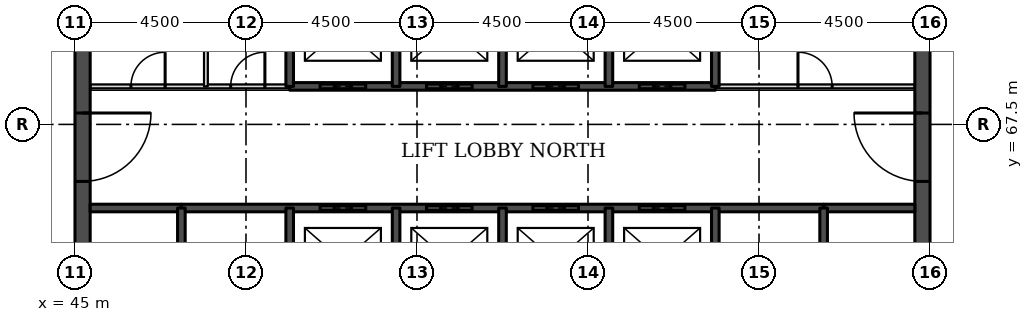
"""IFC4 building model, lengths in metres.
Left out: names, types, materials, properties, quantities, classifications, styles, units other than length and angle.
Written with IfcOpenShell. Run it as: python <this file> out.ifc"""

import sys

from ifc_helpers import new_model, si_unit, direction, frame, frame_2d, origin, place, context, subcontext, project, spatial, rectangle, extrude, element, fill, save


model = new_model("IFC4")
c1 = context("Model", 3, precision=1e-05, world=origin(), true_north=direction((0.0, 1.0)))
c2 = subcontext(c1, "Body", "Model", "MODEL_VIEW")
j1 = project(units=[si_unit("LENGTHUNIT", "METRE"), si_unit("PLANEANGLEUNIT", "RADIAN")], contexts=[c1])
p1 = place(None, origin())
s1 = spatial("IfcSite", under=j1, at=p1, CompositionType="ELEMENT")
p2 = place(p1, origin())
s2 = spatial("IfcBuilding", under=s1, at=p2, CompositionType="ELEMENT")
p3 = place(p2, frame((0.0, 0.0, 143.1)))
s3 = spatial("IfcBuildingStorey", under=s2, at=p3, CompositionType="ELEMENT", Elevation=143.1)
p4 = place(p3, frame((45.2, 49.5, 0.0), z_axis=(0.0, 0.0, 1.0), x_axis=(0.0, 1.0, 0.0)))
e1 = element("IfcWall", 1, at=p4, inside=s3, PredefinedType="SHEAR", context=c2, shape_type="SweptSolid", body=[
    extrude(rectangle(XDim=22.5, YDim=0.4, at=frame_2d((11.25, 0.0))), origin(), (0.0, 0.0, 1.0), 4.6),
])
p5 = place(p4, frame((4.2, 0.0, 0.0)))
e2 = element("IfcOpeningElement", 2, at=p5, cuts=e1, PredefinedType="OPENING", context=c2, shape_type="SweptSolid", body=[
    extrude(rectangle(XDim=1.8, YDim=2.1, at=frame_2d((0.9, 1.05))), frame((0.0, 0.21, 0.0), z_axis=(0.0, -1.0, 0.0), x_axis=(1.0, 0.0, 0.0)), (0.0, 0.0, 1.0), 0.42),
])
p6 = place(p4, frame((6.9, 0.0, 0.0)))
e3 = element("IfcOpeningElement", 3, at=p6, cuts=e1, PredefinedType="OPENING", context=c2, shape_type="SweptSolid", body=[
    extrude(rectangle(XDim=1.1, YDim=2.1, at=frame_2d((0.55, 1.05))), frame((0.0, 0.21, 0.0), z_axis=(0.0, -1.0, 0.0), x_axis=(1.0, 0.0, 0.0)), (0.0, 0.0, 1.0), 0.42),
])
p7 = place(p4, frame((13.6, 0.0, 0.0)))
e4 = element("IfcOpeningElement", 4, at=p7, cuts=e1, PredefinedType="OPENING", context=c2, shape_type="SweptSolid", body=[
    extrude(rectangle(XDim=1.1, YDim=2.1, at=frame_2d((0.55, 1.05))), frame((0.0, 0.21, 0.0), z_axis=(0.0, -1.0, 0.0), x_axis=(1.0, 0.0, 0.0)), (0.0, 0.0, 1.0), 0.42),
])
p8 = place(p4, frame((16.5, 0.0, 0.0)))
e5 = element("IfcOpeningElement", 5, at=p8, cuts=e1, PredefinedType="OPENING", context=c2, shape_type="SweptSolid", body=[
    extrude(rectangle(XDim=1.8, YDim=2.1, at=frame_2d((0.9, 1.05))), frame((0.0, 0.21, 0.0), z_axis=(0.0, -1.0, 0.0), x_axis=(1.0, 0.0, 0.0)), (0.0, 0.0, 1.0), 0.42),
])
p9 = place(p3, frame((67.3, 49.5, 0.0), z_axis=(0.0, 0.0, 1.0), x_axis=(0.0, 1.0, 0.0)))
e6 = element("IfcWall", 6, at=p9, inside=s3, PredefinedType="SHEAR", context=c2, shape_type="SweptSolid", body=[
    extrude(rectangle(XDim=22.5, YDim=0.4, at=frame_2d((11.25, 0.0))), origin(), (0.0, 0.0, 1.0), 4.6),
])
p10 = place(p9, frame((4.2, 0.0, 0.0)))
e7 = element("IfcOpeningElement", 7, at=p10, cuts=e6, PredefinedType="OPENING", context=c2, shape_type="SweptSolid", body=[
    extrude(rectangle(XDim=1.8, YDim=2.1, at=frame_2d((0.9, 1.05))), frame((0.0, 0.21, 0.0), z_axis=(0.0, -1.0, 0.0), x_axis=(1.0, 0.0, 0.0)), (0.0, 0.0, 1.0), 0.42),
])
p11 = place(p9, frame((6.9, 0.0, 0.0)))
e8 = element("IfcOpeningElement", 8, at=p11, cuts=e6, PredefinedType="OPENING", context=c2, shape_type="SweptSolid", body=[
    extrude(rectangle(XDim=1.1, YDim=2.1, at=frame_2d((0.55, 1.05))), frame((0.0, 0.21, 0.0), z_axis=(0.0, -1.0, 0.0), x_axis=(1.0, 0.0, 0.0)), (0.0, 0.0, 1.0), 0.42),
])
p12 = place(p9, frame((13.6, 0.0, 0.0)))
e9 = element("IfcOpeningElement", 9, at=p12, cuts=e6, PredefinedType="OPENING", context=c2, shape_type="SweptSolid", body=[
    extrude(rectangle(XDim=1.1, YDim=2.1, at=frame_2d((0.55, 1.05))), frame((0.0, 0.21, 0.0), z_axis=(0.0, -1.0, 0.0), x_axis=(1.0, 0.0, 0.0)), (0.0, 0.0, 1.0), 0.42),
])
p13 = place(p9, frame((16.5, 0.0, 0.0)))
e10 = element("IfcOpeningElement", 10, at=p13, cuts=e6, PredefinedType="OPENING", context=c2, shape_type="SweptSolid", body=[
    extrude(rectangle(XDim=1.8, YDim=2.1, at=frame_2d((0.9, 1.05))), frame((0.0, 0.21, 0.0), z_axis=(0.0, -1.0, 0.0), x_axis=(1.0, 0.0, 0.0)), (0.0, 0.0, 1.0), 0.42),
])
for number, where, z_axis, x_axis in (
    (11, (45.4, 65.3, 0.0), (0.0, 0.0, 1.0), (1.0, 0.0, 0.0)),
    (12, (64.7, 65.3, 0.0), (0.0, 0.0, 1.0), (1.0, 0.0, 0.0)),
):
    element("IfcWall", number, at=place(p3, frame(where, z_axis=z_axis, x_axis=x_axis)), inside=s3, PredefinedType="SOLIDWALL", context=c2, shape_type="SweptSolid", body=[
        extrude(rectangle(XDim=2.4, YDim=0.2, at=frame_2d((1.2, 0.0))), origin(), (0.0, 0.0, 1.0), 4.45),
    ])
p14 = place(p3, frame((47.8, 65.3, 0.0), z_axis=(0.0, 0.0, 1.0), x_axis=(1.0, 0.0, 0.0)))
e13 = element("IfcWall", 13, at=p14, inside=s3, PredefinedType="SOLIDWALL", context=c2, shape_type="SweptSolid", body=[
    extrude(rectangle(XDim=16.9, YDim=0.2, at=frame_2d((8.45, 0.0))), origin(), (0.0, 0.0, 1.0), 4.45),
])
p15 = place(p14, frame((3.65, 0.0, 0.0)))
e14 = element("IfcOpeningElement", 14, at=p15, cuts=e13, PredefinedType="OPENING", context=c2, shape_type="SweptSolid", body=[
    extrude(rectangle(XDim=1.2, YDim=2.1, at=frame_2d((0.6, 1.05))), frame((0.0, 0.11, 0.0), z_axis=(0.0, -1.0, 0.0), x_axis=(1.0, 0.0, 0.0)), (0.0, 0.0, 1.0), 0.22),
])
p16 = place(p14, frame((6.45, 0.0, 0.0)))
e15 = element("IfcOpeningElement", 15, at=p16, cuts=e13, PredefinedType="OPENING", context=c2, shape_type="SweptSolid", body=[
    extrude(rectangle(XDim=1.2, YDim=2.1, at=frame_2d((0.6, 1.05))), frame((0.0, 0.11, 0.0), z_axis=(0.0, -1.0, 0.0), x_axis=(1.0, 0.0, 0.0)), (0.0, 0.0, 1.0), 0.22),
])
p17 = place(p14, frame((9.25, 0.0, 0.0)))
e16 = element("IfcOpeningElement", 16, at=p17, cuts=e13, PredefinedType="OPENING", context=c2, shape_type="SweptSolid", body=[
    extrude(rectangle(XDim=1.2, YDim=2.1, at=frame_2d((0.6, 1.05))), frame((0.0, 0.11, 0.0), z_axis=(0.0, -1.0, 0.0), x_axis=(1.0, 0.0, 0.0)), (0.0, 0.0, 1.0), 0.22),
])
p18 = place(p14, frame((12.05, 0.0, 0.0)))
e17 = element("IfcOpeningElement", 17, at=p18, cuts=e13, PredefinedType="OPENING", context=c2, shape_type="SweptSolid", body=[
    extrude(rectangle(XDim=1.2, YDim=2.1, at=frame_2d((0.6, 1.05))), frame((0.0, 0.11, 0.0), z_axis=(0.0, -1.0, 0.0), x_axis=(1.0, 0.0, 0.0)), (0.0, 0.0, 1.0), 0.22),
])
p19 = place(p3, frame((45.4, 68.5, 0.0), z_axis=(0.0, 0.0, 1.0), x_axis=(1.0, 0.0, 0.0)))
e18 = element("IfcWall", 18, at=p19, inside=s3, PredefinedType="PARTITIONING", context=c2, shape_type="SweptSolid", body=[
    extrude(rectangle(XDim=5.25, YDim=0.1, at=frame_2d((2.625, 0.0))), origin(), (0.0, 0.0, 1.0), 4.45),
])
p20 = place(p19, frame((1.073, 0.0, 0.0)))
e19 = element("IfcOpeningElement", 19, at=p20, cuts=e18, PredefinedType="OPENING", context=c2, shape_type="SweptSolid", body=[
    extrude(rectangle(XDim=0.9, YDim=2.1, at=frame_2d((0.45, 1.05))), frame((0.0, 0.06, 0.0), z_axis=(0.0, -1.0, 0.0), x_axis=(1.0, 0.0, 0.0)), (0.0, 0.0, 1.0), 0.12),
])
p21 = place(p19, frame((3.698, 0.0, 0.0)))
e20 = element("IfcOpeningElement", 20, at=p21, cuts=e18, PredefinedType="OPENING", context=c2, shape_type="SweptSolid", body=[
    extrude(rectangle(XDim=0.9, YDim=2.1, at=frame_2d((0.45, 1.05))), frame((0.0, 0.06, 0.0), z_axis=(0.0, -1.0, 0.0), x_axis=(1.0, 0.0, 0.0)), (0.0, 0.0, 1.0), 0.12),
])
p22 = place(p3, frame((61.85, 68.5, 0.0), z_axis=(0.0, 0.0, 1.0), x_axis=(1.0, 0.0, 0.0)))
e21 = element("IfcWall", 21, at=p22, inside=s3, PredefinedType="PARTITIONING", context=c2, shape_type="SweptSolid", body=[
    extrude(rectangle(XDim=5.25, YDim=0.1, at=frame_2d((2.625, 0.0))), origin(), (0.0, 0.0, 1.0), 4.45),
])
p23 = place(p22, frame((2.175, 0.0, 0.0)))
e22 = element("IfcOpeningElement", 22, at=p23, cuts=e21, PredefinedType="OPENING", context=c2, shape_type="SweptSolid", body=[
    extrude(rectangle(XDim=0.9, YDim=2.1, at=frame_2d((0.45, 1.05))), frame((0.0, 0.06, 0.0), z_axis=(0.0, -1.0, 0.0), x_axis=(1.0, 0.0, 0.0)), (0.0, 0.0, 1.0), 0.12),
])
p24 = place(p3, frame((50.65, 68.5, 0.0), z_axis=(0.0, 0.0, 1.0), x_axis=(1.0, 0.0, 0.0)))
e23 = element("IfcWall", 23, at=p24, inside=s3, PredefinedType="SOLIDWALL", context=c2, shape_type="SweptSolid", body=[
    extrude(rectangle(XDim=11.2, YDim=0.2, at=frame_2d((5.6, 0.0))), origin(), (0.0, 0.0, 1.0), 4.45),
])
p25 = place(p24, frame((0.8, 0.0, 0.0)))
e24 = element("IfcOpeningElement", 24, at=p25, cuts=e23, PredefinedType="OPENING", context=c2, shape_type="SweptSolid", body=[
    extrude(rectangle(XDim=1.2, YDim=2.1, at=frame_2d((0.6, 1.05))), frame((0.0, 0.11, 0.0), z_axis=(0.0, -1.0, 0.0), x_axis=(1.0, 0.0, 0.0)), (0.0, 0.0, 1.0), 0.22),
])
p26 = place(p24, frame((3.6, 0.0, 0.0)))
e25 = element("IfcOpeningElement", 25, at=p26, cuts=e23, PredefinedType="OPENING", context=c2, shape_type="SweptSolid", body=[
    extrude(rectangle(XDim=1.2, YDim=2.1, at=frame_2d((0.6, 1.05))), frame((0.0, 0.11, 0.0), z_axis=(0.0, -1.0, 0.0), x_axis=(1.0, 0.0, 0.0)), (0.0, 0.0, 1.0), 0.22),
])
p27 = place(p24, frame((6.4, 0.0, 0.0)))
e26 = element("IfcOpeningElement", 26, at=p27, cuts=e23, PredefinedType="OPENING", context=c2, shape_type="SweptSolid", body=[
    extrude(rectangle(XDim=1.2, YDim=2.1, at=frame_2d((0.6, 1.05))), frame((0.0, 0.11, 0.0), z_axis=(0.0, -1.0, 0.0), x_axis=(1.0, 0.0, 0.0)), (0.0, 0.0, 1.0), 0.22),
])
p28 = place(p24, frame((9.2, 0.0, 0.0)))
e27 = element("IfcOpeningElement", 27, at=p28, cuts=e23, PredefinedType="OPENING", context=c2, shape_type="SweptSolid", body=[
    extrude(rectangle(XDim=1.2, YDim=2.1, at=frame_2d((0.6, 1.05))), frame((0.0, 0.11, 0.0), z_axis=(0.0, -1.0, 0.0), x_axis=(1.0, 0.0, 0.0)), (0.0, 0.0, 1.0), 0.22),
])
p29 = place(p3, frame((47.8, 62.0, 0.0), z_axis=(0.0, 0.0, 1.0), x_axis=(0.0, 1.0, 0.0)))
e28 = element("IfcWall", 28, at=p29, inside=s3, PredefinedType="SOLIDWALL", context=c2, shape_type="SweptSolid", body=[
    extrude(rectangle(XDim=3.3, YDim=0.2, at=frame_2d((1.65, 0.0))), origin(), (0.0, 0.0, 1.0), 4.45),
])
p30 = place(p29, frame((1.1, 0.0, 0.0)))
e29 = element("IfcOpeningElement", 29, at=p30, cuts=e28, PredefinedType="OPENING", context=c2, shape_type="SweptSolid", body=[
    extrude(rectangle(XDim=1.1, YDim=2.1, at=frame_2d((0.55, 1.05))), frame((0.0, 0.11, 0.0), z_axis=(0.0, -1.0, 0.0), x_axis=(1.0, 0.0, 0.0)), (0.0, 0.0, 1.0), 0.22),
])
p31 = place(p3, frame((48.445, 68.5, 0.0), z_axis=(0.0, 0.0, 1.0), x_axis=(0.0, 1.0, 0.0)))
e30 = element("IfcWall", 30, at=p31, inside=s3, PredefinedType="PARTITIONING", context=c2, shape_type="SweptSolid", body=[
    extrude(rectangle(XDim=3.1, YDim=0.1, at=frame_2d((1.55, 0.0))), origin(), (0.0, 0.0, 1.0), 4.45),
])
p32 = place(p3, frame((50.65, 62.0, 0.0), z_axis=(0.0, 0.0, 1.0), x_axis=(0.0, 1.0, 0.0)))
e31 = element("IfcWall", 31, at=p32, inside=s3, PredefinedType="SOLIDWALL", context=c2, shape_type="SweptSolid", body=[
    extrude(rectangle(XDim=3.3, YDim=0.2, at=frame_2d((1.65, 0.0))), origin(), (0.0, 0.0, 1.0), 4.45),
])
p33 = place(p3, frame((50.65, 68.5, 0.0), z_axis=(0.0, 0.0, 1.0), x_axis=(0.0, 1.0, 0.0)))
e32 = element("IfcWall", 32, at=p33, inside=s3, PredefinedType="SOLIDWALL", context=c2, shape_type="SweptSolid", body=[
    extrude(rectangle(XDim=3.1, YDim=0.2, at=frame_2d((1.55, 0.0))), origin(), (0.0, 0.0, 1.0), 4.45),
])
p34 = place(p3, frame((53.45, 62.5, 0.0), z_axis=(0.0, 0.0, 1.0), x_axis=(0.0, 1.0, 0.0)))
e33 = element("IfcWall", 33, at=p34, inside=s3, PredefinedType="SOLIDWALL", context=c2, shape_type="SweptSolid", body=[
    extrude(rectangle(XDim=2.8, YDim=0.2, at=frame_2d((1.4, 0.0))), origin(), (0.0, 0.0, 1.0), 4.45),
])
p35 = place(p3, frame((53.45, 68.5, 0.0), z_axis=(0.0, 0.0, 1.0), x_axis=(0.0, 1.0, 0.0)))
e34 = element("IfcWall", 34, at=p35, inside=s3, PredefinedType="SOLIDWALL", context=c2, shape_type="SweptSolid", body=[
    extrude(rectangle(XDim=3.1, YDim=0.2, at=frame_2d((1.55, 0.0))), origin(), (0.0, 0.0, 1.0), 4.45),
])
p36 = place(p3, frame((56.25, 62.5, 0.0), z_axis=(0.0, 0.0, 1.0), x_axis=(0.0, 1.0, 0.0)))
e35 = element("IfcWall", 35, at=p36, inside=s3, PredefinedType="SOLIDWALL", context=c2, shape_type="SweptSolid", body=[
    extrude(rectangle(XDim=2.8, YDim=0.2, at=frame_2d((1.4, 0.0))), origin(), (0.0, 0.0, 1.0), 4.45),
])
p37 = place(p3, frame((56.25, 68.5, 0.0), z_axis=(0.0, 0.0, 1.0), x_axis=(0.0, 1.0, 0.0)))
e36 = element("IfcWall", 36, at=p37, inside=s3, PredefinedType="SOLIDWALL", context=c2, shape_type="SweptSolid", body=[
    extrude(rectangle(XDim=3.1, YDim=0.2, at=frame_2d((1.55, 0.0))), origin(), (0.0, 0.0, 1.0), 4.45),
])
p38 = place(p3, frame((59.05, 62.5, 0.0), z_axis=(0.0, 0.0, 1.0), x_axis=(0.0, 1.0, 0.0)))
e37 = element("IfcWall", 37, at=p38, inside=s3, PredefinedType="SOLIDWALL", context=c2, shape_type="SweptSolid", body=[
    extrude(rectangle(XDim=2.8, YDim=0.2, at=frame_2d((1.4, 0.0))), origin(), (0.0, 0.0, 1.0), 4.45),
])
p39 = place(p3, frame((59.05, 68.5, 0.0), z_axis=(0.0, 0.0, 1.0), x_axis=(0.0, 1.0, 0.0)))
e38 = element("IfcWall", 38, at=p39, inside=s3, PredefinedType="SOLIDWALL", context=c2, shape_type="SweptSolid", body=[
    extrude(rectangle(XDim=3.1, YDim=0.2, at=frame_2d((1.55, 0.0))), origin(), (0.0, 0.0, 1.0), 4.45),
])
p40 = place(p3, frame((61.85, 62.0, 0.0), z_axis=(0.0, 0.0, 1.0), x_axis=(0.0, 1.0, 0.0)))
e39 = element("IfcWall", 39, at=p40, inside=s3, PredefinedType="SOLIDWALL", context=c2, shape_type="SweptSolid", body=[
    extrude(rectangle(XDim=3.3, YDim=0.2, at=frame_2d((1.65, 0.0))), origin(), (0.0, 0.0, 1.0), 4.45),
])
p41 = place(p3, frame((61.85, 68.5, 0.0), z_axis=(0.0, 0.0, 1.0), x_axis=(0.0, 1.0, 0.0)))
e40 = element("IfcWall", 40, at=p41, inside=s3, PredefinedType="SOLIDWALL", context=c2, shape_type="SweptSolid", body=[
    extrude(rectangle(XDim=3.1, YDim=0.2, at=frame_2d((1.55, 0.0))), origin(), (0.0, 0.0, 1.0), 4.45),
])
p42 = place(p3, frame((64.7, 62.0, 0.0), z_axis=(0.0, 0.0, 1.0), x_axis=(0.0, 1.0, 0.0)))
e41 = element("IfcWall", 41, at=p42, inside=s3, PredefinedType="SOLIDWALL", context=c2, shape_type="SweptSolid", body=[
    extrude(rectangle(XDim=3.3, YDim=0.2, at=frame_2d((1.65, 0.0))), origin(), (0.0, 0.0, 1.0), 4.45),
])
p43 = place(p42, frame((1.1, 0.0, 0.0)))
e42 = element("IfcOpeningElement", 42, at=p43, cuts=e41, PredefinedType="OPENING", context=c2, shape_type="SweptSolid", body=[
    extrude(rectangle(XDim=1.1, YDim=2.1, at=frame_2d((0.55, 1.05))), frame((0.0, 0.11, 0.0), z_axis=(0.0, -1.0, 0.0), x_axis=(1.0, 0.0, 0.0)), (0.0, 0.0, 1.0), 0.22),
])
p44 = place(p15, origin())
e43 = element("IfcDoor", 43, at=p44, inside=s3, OperationType="DOUBLE_DOOR_SLIDING", PredefinedType="DOOR", context=c2, shape_type="SweptSolid", body=[
    extrude(rectangle(XDim=1.2, YDim=2.1, at=frame_2d((0.6, 1.05))), frame((0.0, 0.025, 0.0), z_axis=(0.0, -1.0, 0.0), x_axis=(1.0, 0.0, 0.0)), (0.0, 0.0, 1.0), 0.05),
])
fill(e14, e43)
p45 = place(p16, origin())
e44 = element("IfcDoor", 44, at=p45, inside=s3, OperationType="DOUBLE_DOOR_SLIDING", PredefinedType="DOOR", context=c2, shape_type="SweptSolid", body=[
    extrude(rectangle(XDim=1.2, YDim=2.1, at=frame_2d((0.6, 1.05))), frame((0.0, 0.025, 0.0), z_axis=(0.0, -1.0, 0.0), x_axis=(1.0, 0.0, 0.0)), (0.0, 0.0, 1.0), 0.05),
])
fill(e15, e44)
p46 = place(p17, origin())
e45 = element("IfcDoor", 45, at=p46, inside=s3, OperationType="DOUBLE_DOOR_SLIDING", PredefinedType="DOOR", context=c2, shape_type="SweptSolid", body=[
    extrude(rectangle(XDim=1.2, YDim=2.1, at=frame_2d((0.6, 1.05))), frame((0.0, 0.025, 0.0), z_axis=(0.0, -1.0, 0.0), x_axis=(1.0, 0.0, 0.0)), (0.0, 0.0, 1.0), 0.05),
])
fill(e16, e45)
p47 = place(p18, origin())
e46 = element("IfcDoor", 46, at=p47, inside=s3, OperationType="DOUBLE_DOOR_SLIDING", PredefinedType="DOOR", context=c2, shape_type="SweptSolid", body=[
    extrude(rectangle(XDim=1.2, YDim=2.1, at=frame_2d((0.6, 1.05))), frame((0.0, 0.025, 0.0), z_axis=(0.0, -1.0, 0.0), x_axis=(1.0, 0.0, 0.0)), (0.0, 0.0, 1.0), 0.05),
])
fill(e17, e46)
p48 = place(p25, origin())
e47 = element("IfcDoor", 47, at=p48, inside=s3, OperationType="DOUBLE_DOOR_SLIDING", PredefinedType="DOOR", context=c2, shape_type="SweptSolid", body=[
    extrude(rectangle(XDim=1.2, YDim=2.1, at=frame_2d((0.6, 1.05))), frame((0.0, 0.025, 0.0), z_axis=(0.0, -1.0, 0.0), x_axis=(1.0, 0.0, 0.0)), (0.0, 0.0, 1.0), 0.05),
])
fill(e24, e47)
p49 = place(p26, origin())
e48 = element("IfcDoor", 48, at=p49, inside=s3, OperationType="DOUBLE_DOOR_SLIDING", PredefinedType="DOOR", context=c2, shape_type="SweptSolid", body=[
    extrude(rectangle(XDim=1.2, YDim=2.1, at=frame_2d((0.6, 1.05))), frame((0.0, 0.025, 0.0), z_axis=(0.0, -1.0, 0.0), x_axis=(1.0, 0.0, 0.0)), (0.0, 0.0, 1.0), 0.05),
])
fill(e25, e48)
p50 = place(p27, origin())
e49 = element("IfcDoor", 49, at=p50, inside=s3, OperationType="DOUBLE_DOOR_SLIDING", PredefinedType="DOOR", context=c2, shape_type="SweptSolid", body=[
    extrude(rectangle(XDim=1.2, YDim=2.1, at=frame_2d((0.6, 1.05))), frame((0.0, 0.025, 0.0), z_axis=(0.0, -1.0, 0.0), x_axis=(1.0, 0.0, 0.0)), (0.0, 0.0, 1.0), 0.05),
])
fill(e26, e49)
p51 = place(p28, origin())
e50 = element("IfcDoor", 50, at=p51, inside=s3, OperationType="DOUBLE_DOOR_SLIDING", PredefinedType="DOOR", context=c2, shape_type="SweptSolid", body=[
    extrude(rectangle(XDim=1.2, YDim=2.1, at=frame_2d((0.6, 1.05))), frame((0.0, 0.025, 0.0), z_axis=(0.0, -1.0, 0.0), x_axis=(1.0, 0.0, 0.0)), (0.0, 0.0, 1.0), 0.05),
])
fill(e27, e50)
p52 = place(p8, frame((1.8, 0.0, 0.0), z_axis=(0.0, 0.0, 1.0), x_axis=(-1.0, 0.0, 0.0)))
e51 = element("IfcDoor", 51, at=p52, inside=s3, OperationType="SINGLE_SWING_LEFT", PredefinedType="DOOR", context=c2, shape_type="SweptSolid", body=[
    extrude(rectangle(XDim=1.8, YDim=2.1, at=frame_2d((0.9, 1.05))), frame((0.0, 0.025, 0.0), z_axis=(0.0, -1.0, 0.0), x_axis=(1.0, 0.0, 0.0)), (0.0, 0.0, 1.0), 0.05),
])
fill(e5, e51)
p53 = place(p13, origin())
e52 = element("IfcDoor", 52, at=p53, inside=s3, OperationType="SINGLE_SWING_RIGHT", PredefinedType="DOOR", context=c2, shape_type="SweptSolid", body=[
    extrude(rectangle(XDim=1.8, YDim=2.1, at=frame_2d((0.9, 1.05))), frame((0.0, 0.025, 0.0), z_axis=(0.0, -1.0, 0.0), x_axis=(1.0, 0.0, 0.0)), (0.0, 0.0, 1.0), 0.05),
])
fill(e10, e52)
p54 = place(p23, origin())
e53 = element("IfcDoor", 53, at=p54, inside=s3, OperationType="SINGLE_SWING_LEFT", PredefinedType="DOOR", context=c2, shape_type="SweptSolid", body=[
    extrude(rectangle(XDim=0.9, YDim=2.1, at=frame_2d((0.45, 1.05))), frame((0.0, 0.025, 0.0), z_axis=(0.0, -1.0, 0.0), x_axis=(1.0, 0.0, 0.0)), (0.0, 0.0, 1.0), 0.05),
])
fill(e22, e53)
p55 = place(p20, origin())
e54 = element("IfcDoor", 54, at=p55, inside=s3, OperationType="SINGLE_SWING_RIGHT", PredefinedType="DOOR", context=c2, shape_type="SweptSolid", body=[
    extrude(rectangle(XDim=0.9, YDim=2.1, at=frame_2d((0.45, 1.05))), frame((0.0, 0.025, 0.0), z_axis=(0.0, -1.0, 0.0), x_axis=(1.0, 0.0, 0.0)), (0.0, 0.0, 1.0), 0.05),
])
fill(e19, e54)
p56 = place(p21, origin())
e55 = element("IfcDoor", 55, at=p56, inside=s3, OperationType="SINGLE_SWING_RIGHT", PredefinedType="DOOR", context=c2, shape_type="SweptSolid", body=[
    extrude(rectangle(XDim=0.9, YDim=2.1, at=frame_2d((0.45, 1.05))), frame((0.0, 0.025, 0.0), z_axis=(0.0, -1.0, 0.0), x_axis=(1.0, 0.0, 0.0)), (0.0, 0.0, 1.0), 0.05),
])
fill(e20, e55)
save(model, sys.argv[1])
